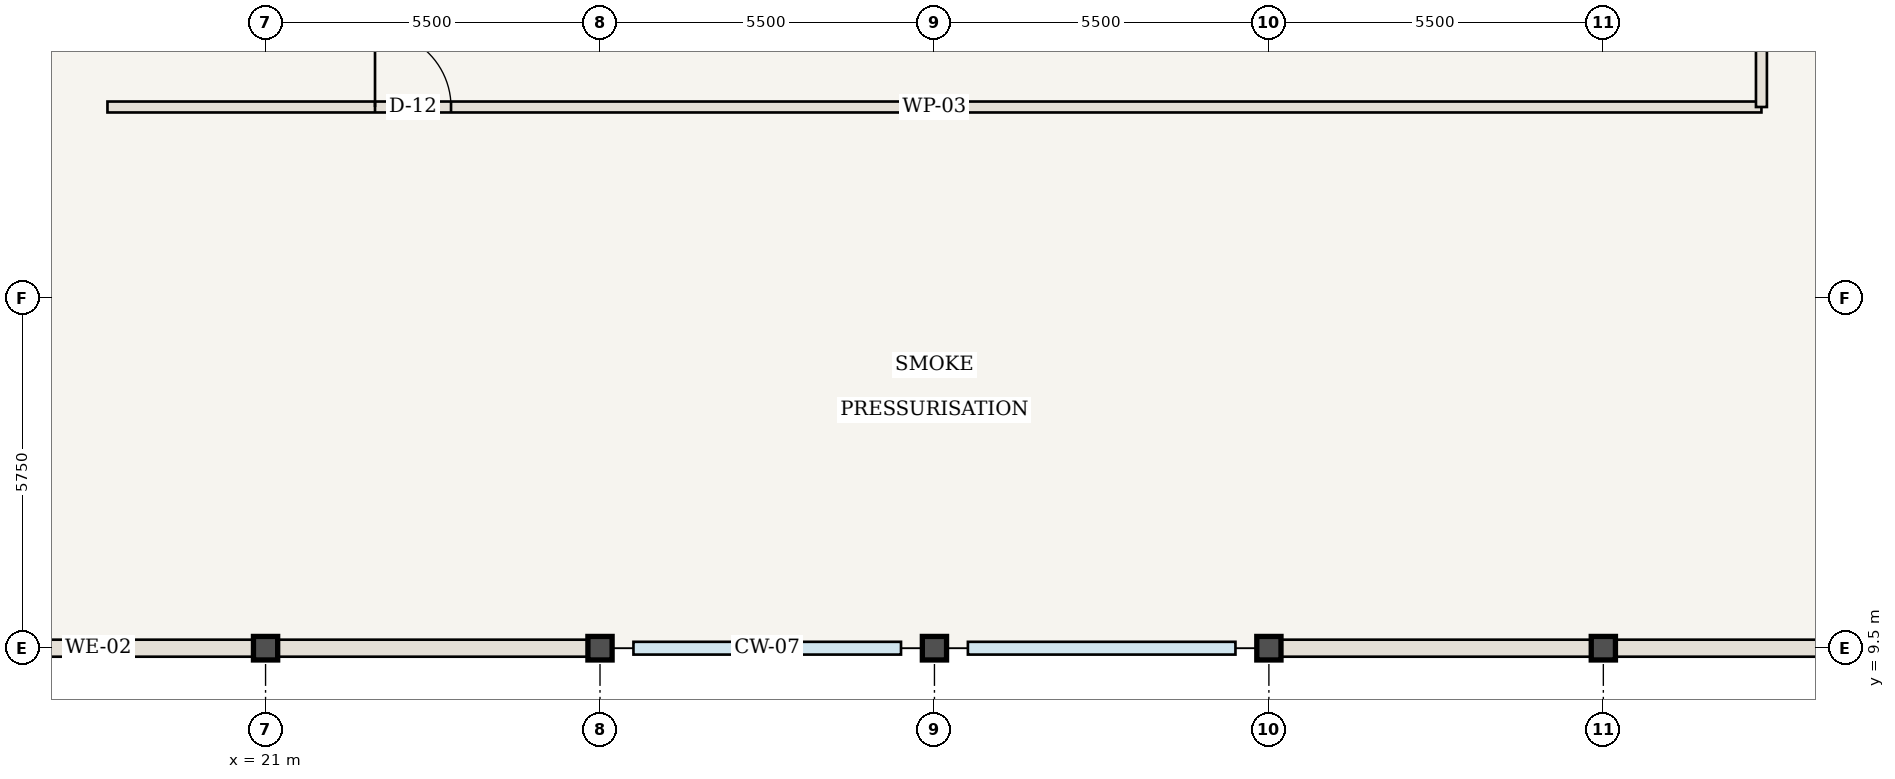
"""IFC4 building model, lengths in metres.
Left out: names, types, materials, properties, quantities, classifications, styles, units other than length and angle.
Written with IfcOpenShell. Run it as: python <this file> out.ifc"""

import sys

from ifc_helpers import new_model, si_unit, direction, frame, frame_2d, origin, origin_2d, place, context, subcontext, project, spatial, rectangle, i_section, extrude, element, fill, save


model = new_model("IFC4")
c1 = context("Model", 3, precision=1e-05, world=origin(), true_north=direction((0.0, 1.0)))
c2 = subcontext(c1, "Body", "Model", "MODEL_VIEW")
j1 = project(units=[si_unit("LENGTHUNIT", "METRE"), si_unit("PLANEANGLEUNIT", "RADIAN")], contexts=[c1])
p1 = place(None, origin())
s1 = spatial("IfcSite", under=j1, at=p1, CompositionType="ELEMENT")
p2 = place(p1, origin())
s2 = spatial("IfcBuilding", under=s1, at=p2, CompositionType="ELEMENT")
p3 = place(p2, frame((0.0, 0.0, 326.9)))
s3 = spatial("IfcBuildingStorey", under=s2, at=p3, CompositionType="ELEMENT", Elevation=326.9)
for number, where, z_axis, x_axis in (
    (1, (21.0, 9.5, 0.0), (0.0, 0.0, 1.0), (1.0, 0.0, 0.0)),
    (2, (26.5, 9.5, 0.0), (0.0, 0.0, 1.0), (1.0, 0.0, 0.0)),
    (3, (32.0, 9.5, 0.0), (0.0, 0.0, 1.0), (1.0, 0.0, 0.0)),
    (4, (37.5, 9.5, 0.0), (0.0, 0.0, 1.0), (1.0, 0.0, 0.0)),
    (5, (43.0, 9.5, 0.0), (0.0, 0.0, 1.0), (1.0, 0.0, 0.0)),
):
    element("IfcColumn", number, at=place(p3, frame(where, z_axis=z_axis, x_axis=x_axis)), inside=s3, PredefinedType="COLUMN", context=c2, shape_type="SweptSolid", body=[
        extrude(i_section(OverallWidth=0.398, OverallDepth=0.387, WebThickness=0.021, FlangeThickness=0.033, at=origin_2d()), origin(), (0.0, 0.0, 1.0), 4.55),
    ])
p4 = place(p3, frame((18.4, 18.4, 0.0), z_axis=(0.0, 0.0, 1.0), x_axis=(1.0, 0.0, 0.0)))
e6 = element("IfcWall", 6, at=p4, inside=s3, PredefinedType="STANDARD", context=c2, shape_type="SweptSolid", body=[
    extrude(rectangle(XDim=27.2, YDim=0.18, at=frame_2d((13.6, 0.0))), origin(), (0.0, 0.0, 1.0), 4.29),
])
p5 = place(p4, frame((4.4, 0.0, 0.0)))
e7 = element("IfcOpeningElement", 7, at=p5, cuts=e6, PredefinedType="OPENING", context=c2, shape_type="SweptSolid", body=[
    extrude(rectangle(XDim=1.25, YDim=2.2, at=frame_2d((0.625, 1.1))), frame((0.0, 0.1, 0.0), z_axis=(0.0, -1.0, 0.0), x_axis=(1.0, 0.0, 0.0)), (0.0, 0.0, 1.0), 0.2),
])
p6 = place(p3, frame((45.6, 18.4, 0.0), z_axis=(0.0, 0.0, 1.0), x_axis=(0.0, 1.0, 0.0)))
e8 = element("IfcWall", 8, at=p6, inside=s3, PredefinedType="STANDARD", context=c2, shape_type="SweptSolid", body=[
    extrude(rectangle(XDim=27.2, YDim=0.18, at=frame_2d((13.6, 0.0))), origin(), (0.0, 0.0, 1.0), 4.29),
])
p7 = place(p6, frame((14.55, 0.0, 0.0)))
e9 = element("IfcOpeningElement", 9, at=p7, cuts=e8, PredefinedType="OPENING", context=c2, shape_type="SweptSolid", body=[
    extrude(rectangle(XDim=1.25, YDim=2.2, at=frame_2d((0.625, 1.1))), frame((0.0, 0.1, 0.0), z_axis=(0.0, -1.0, 0.0), x_axis=(1.0, 0.0, 0.0)), (0.0, 0.0, 1.0), 0.2),
])
for number, where, z_axis, x_axis in (
    (10, (21.0, 9.5, 0.0), (0.0, 0.0, 1.0), (-1.0, 0.0, 0.0)),
    (11, (26.5, 9.5, 0.0), (0.0, 0.0, 1.0), (-1.0, 0.0, 0.0)),
    (12, (43.0, 9.5, 0.0), (0.0, 0.0, 1.0), (-1.0, 0.0, 0.0)),
    (13, (48.5, 9.5, 0.0), (0.0, 0.0, 1.0), (-1.0, 0.0, 0.0)),
):
    element("IfcWall", number, at=place(p3, frame(where, z_axis=z_axis, x_axis=x_axis)), inside=s3, PredefinedType="USERDEFINED", context=c2, shape_type="SweptSolid", body=[
        extrude(rectangle(XDim=5.5, YDim=0.28, at=frame_2d((2.75, 0.0))), origin(), (0.0, 0.0, 1.0), 3.57),
    ])
p8 = place(p5, origin())
e14 = element("IfcDoor", 14, at=p8, inside=s3, OperationType="SINGLE_SWING_LEFT", PredefinedType="DOOR", context=c2, shape_type="SweptSolid", body=[
    extrude(rectangle(XDim=1.25, YDim=2.2, at=frame_2d((0.625, 1.1))), frame((0.0, 0.025, 0.0), z_axis=(0.0, -1.0, 0.0), x_axis=(1.0, 0.0, 0.0)), (0.0, 0.0, 1.0), 0.05),
])
fill(e7, e14)
save(model, sys.argv[1])
